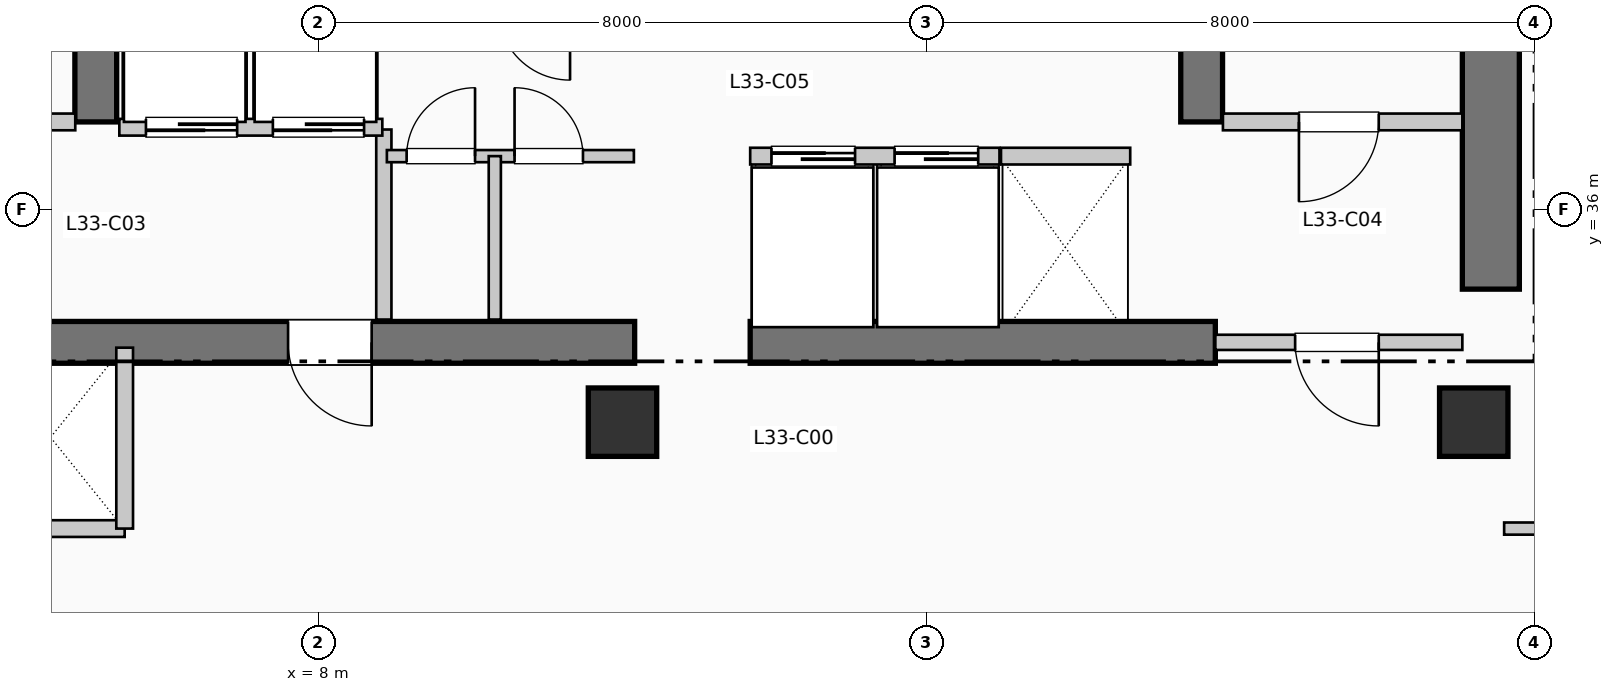
"""IFC4 building model, lengths in metres.
Left out: names, types, materials, properties, quantities, classifications, styles, units other than length and angle.
Written with IfcOpenShell. Run it as: python <this file> out.ifc"""

import sys

from ifc_helpers import new_model, si_unit, direction, frame, frame_2d, origin, origin_2d, place, context, subcontext, project, spatial, rectangle, extrude, element, fill, save


model = new_model("IFC4")
c1 = context("Model", 3, precision=1e-05, world=origin(), true_north=direction((0.0, 1.0)))
c2 = subcontext(c1, "Body", "Model", "MODEL_VIEW")
j1 = project(units=[si_unit("LENGTHUNIT", "METRE"), si_unit("PLANEANGLEUNIT", "RADIAN")], contexts=[c1])
p1 = place(None, origin())
s1 = spatial("IfcSite", under=j1, at=p1, CompositionType="ELEMENT")
p2 = place(p1, origin())
s2 = spatial("IfcBuilding", under=s1, at=p2, CompositionType="ELEMENT")
p3 = place(p2, frame((0.0, 0.0, 138.93)))
s3 = spatial("IfcBuildingStorey", under=s2, at=p3, CompositionType="ELEMENT", Elevation=138.93)
p4 = place(p3, frame((23.425, 34.95, 0.0), z_axis=(0.0, 0.0, 1.0), x_axis=(0.0, 1.0, 0.0)))
e1 = element("IfcWall", 1, at=p4, inside=s3, PredefinedType="SHEAR", context=c2, shape_type="SweptSolid", body=[
    extrude(rectangle(XDim=10.64, YDim=0.75, at=frame_2d((5.32, 0.0))), origin(), (0.0, 0.0, 1.0), 3.96),
])
p5 = place(p3, frame((1.45, 34.25, 0.0), z_axis=(0.0, 0.0, 1.0), x_axis=(1.0, 0.0, 0.0)))
e2 = element("IfcWall", 2, at=p5, inside=s3, PredefinedType="SHEAR", context=c2, shape_type="SweptSolid", body=[
    extrude(rectangle(XDim=10.71, YDim=0.55, at=frame_2d((5.355, 0.0))), origin(), (0.0, 0.0, 1.0), 3.96),
])
p6 = place(p5, frame((7.25, 0.0, 0.0), z_axis=(0.0, 0.0, 1.0), x_axis=(-1.0, 0.0, 0.0)))
e3 = element("IfcOpeningElement", 3, at=p6, cuts=e2, PredefinedType="OPENING", context=c2, shape_type="SweptSolid", body=[
    extrude(rectangle(XDim=1.1, YDim=2.15, at=frame_2d((0.55, 1.075))), frame((0.0, 0.285, 0.0), z_axis=(0.0, -1.0, 0.0), x_axis=(1.0, 0.0, 0.0)), (0.0, 0.0, 1.0), 0.57),
])
p7 = place(p3, frame((13.68, 34.25, 0.0), z_axis=(0.0, 0.0, 1.0), x_axis=(1.0, 0.0, 0.0)))
e4 = element("IfcWall", 4, at=p7, inside=s3, PredefinedType="SHEAR", context=c2, shape_type="SweptSolid", body=[
    extrude(rectangle(XDim=6.12, YDim=0.55, at=frame_2d((3.06, 0.0))), origin(), (0.0, 0.0, 1.0), 3.96),
])
for number, where, z_axis, x_axis in (
    (5, (5.07, 37.15, 0.0), (0.0, 0.0, 1.0), (0.0, 1.0, 0.0)),
    (6, (19.62, 37.15, 0.0), (0.0, 0.0, 1.0), (0.0, 1.0, 0.0)),
):
    element("IfcWall", number, at=place(p3, frame(where, z_axis=z_axis, x_axis=x_axis)), inside=s3, PredefinedType="SHEAR", context=c2, shape_type="SweptSolid", body=[
        extrude(rectangle(XDim=7.89, YDim=0.55, at=frame_2d((3.945, 0.0))), origin(), (0.0, 0.0, 1.0), 3.96),
    ])
for number, where, z_axis, x_axis in (
    (7, (12.0, 33.2, 0.0), (0.0, 0.0, 1.0), (1.0, 0.0, 0.0)),
    (8, (23.2, 33.2, 0.0), (0.0, 0.0, 1.0), (1.0, 0.0, 0.0)),
):
    element("IfcColumn", number, at=place(p3, frame(where, z_axis=z_axis, x_axis=x_axis)), inside=s3, PredefinedType="COLUMN", context=c2, shape_type="SweptSolid", body=[
        extrude(rectangle(XDim=0.9, YDim=0.9, at=origin_2d()), origin(), (0.0, 0.0, 1.0), 3.96),
    ])
p8 = place(p3, frame((1.65, 37.15, 0.0), z_axis=(0.0, 0.0, 1.0), x_axis=(1.0, 0.0, 0.0)))
e9 = element("IfcWall", 9, at=p8, inside=s3, PredefinedType="PARTITIONING", context=c2, shape_type="SweptSolid", body=[
    extrude(rectangle(XDim=3.15, YDim=0.22, at=frame_2d((1.575, 0.0))), origin(), (0.0, 0.0, 1.0), 3.71),
])
p9 = place(p8, frame((2.05, 0.0, 0.0), z_axis=(0.0, 0.0, 1.0), x_axis=(-1.0, 0.0, 0.0)))
e10 = element("IfcOpeningElement", 10, at=p9, cuts=e9, PredefinedType="OPENING", context=c2, shape_type="SweptSolid", body=[
    extrude(rectangle(XDim=1.05, YDim=2.15, at=frame_2d((0.525, 1.075))), frame((0.0, 0.12, 0.0), z_axis=(0.0, -1.0, 0.0), x_axis=(1.0, 0.0, 0.0)), (0.0, 0.0, 1.0), 0.24),
])
p10 = place(p3, frame((8.86, 34.55, 0.0), z_axis=(0.0, 0.0, 1.0), x_axis=(0.0, 1.0, 0.0)))
e11 = element("IfcWall", 11, at=p10, inside=s3, PredefinedType="PARTITIONING", context=c2, shape_type="SweptSolid", body=[
    extrude(rectangle(XDim=2.5, YDim=0.2, at=frame_2d((1.25, 0.0))), origin(), (0.0, 0.0, 1.0), 3.71),
])
p11 = place(p3, frame((19.9, 37.15, 0.0), z_axis=(0.0, 0.0, 1.0), x_axis=(1.0, 0.0, 0.0)))
e12 = element("IfcWall", 12, at=p11, inside=s3, PredefinedType="PARTITIONING", context=c2, shape_type="SweptSolid", body=[
    extrude(rectangle(XDim=3.15, YDim=0.22, at=frame_2d((1.575, 0.0))), origin(), (0.0, 0.0, 1.0), 3.71),
])
p12 = place(p11, frame((2.05, 0.0, 0.0), z_axis=(0.0, 0.0, 1.0), x_axis=(-1.0, 0.0, 0.0)))
e13 = element("IfcOpeningElement", 13, at=p12, cuts=e12, PredefinedType="OPENING", context=c2, shape_type="SweptSolid", body=[
    extrude(rectangle(XDim=1.05, YDim=2.15, at=frame_2d((0.525, 1.075))), frame((0.0, 0.12, 0.0), z_axis=(0.0, -1.0, 0.0), x_axis=(1.0, 0.0, 0.0)), (0.0, 0.0, 1.0), 0.24),
])
p13 = place(p3, frame((19.8, 34.25, 0.0), z_axis=(0.0, 0.0, 1.0), x_axis=(1.0, 0.0, 0.0)))
e14 = element("IfcWall", 14, at=p13, inside=s3, PredefinedType="PARTITIONING", context=c2, shape_type="SweptSolid", body=[
    extrude(rectangle(XDim=3.25, YDim=0.2, at=frame_2d((1.625, 0.0))), origin(), (0.0, 0.0, 1.0), 3.71),
])
p14 = place(p13, frame((2.15, 0.0, 0.0), z_axis=(0.0, 0.0, 1.0), x_axis=(-1.0, 0.0, 0.0)))
e15 = element("IfcOpeningElement", 15, at=p14, cuts=e14, PredefinedType="OPENING", context=c2, shape_type="SweptSolid", body=[
    extrude(rectangle(XDim=1.1, YDim=2.15, at=frame_2d((0.55, 1.075))), frame((0.0, 0.11, 0.0), z_axis=(0.0, -1.0, 0.0), x_axis=(1.0, 0.0, 0.0)), (0.0, 0.0, 1.0), 0.22),
])
p15 = place(p3, frame((5.38, 37.08, 0.0), z_axis=(0.0, 0.0, 1.0), x_axis=(1.0, 0.0, 0.0)))
e16 = element("IfcWall", 16, at=p15, inside=s3, PredefinedType="PARTITIONING", context=c2, shape_type="SweptSolid", body=[
    extrude(rectangle(XDim=3.46, YDim=0.22, at=frame_2d((1.73, 0.0))), origin(), (0.0, 0.0, 1.0), 3.71),
])
p16 = place(p15, frame((1.55, 0.0, 0.0), z_axis=(0.0, 0.0, 1.0), x_axis=(-1.0, 0.0, 0.0)))
e17 = element("IfcOpeningElement", 17, at=p16, cuts=e16, PredefinedType="OPENING", context=c2, shape_type="SweptSolid", body=[
    extrude(rectangle(XDim=1.2, YDim=2.2, at=frame_2d((0.6, 1.1))), frame((0.0, 0.12, 0.0), z_axis=(0.0, -1.0, 0.0), x_axis=(1.0, 0.0, 0.0)), (0.0, 0.0, 1.0), 0.24),
])
p17 = place(p15, frame((3.22, 0.0, 0.0), z_axis=(0.0, 0.0, 1.0), x_axis=(-1.0, 0.0, 0.0)))
e18 = element("IfcOpeningElement", 18, at=p17, cuts=e16, PredefinedType="OPENING", context=c2, shape_type="SweptSolid", body=[
    extrude(rectangle(XDim=1.2, YDim=2.2, at=frame_2d((0.6, 1.1))), frame((0.0, 0.12, 0.0), z_axis=(0.0, -1.0, 0.0), x_axis=(1.0, 0.0, 0.0)), (0.0, 0.0, 1.0), 0.24),
])
p18 = place(p3, frame((1.55, 31.8, 0.0), z_axis=(0.0, 0.0, 1.0), x_axis=(1.0, 0.0, 0.0)))
e19 = element("IfcWall", 19, at=p18, inside=s3, PredefinedType="PARTITIONING", context=c2, shape_type="SweptSolid", body=[
    extrude(rectangle(XDim=3.9, YDim=0.22, at=frame_2d((1.95, 0.0))), origin(), (0.0, 0.0, 1.0), 3.71),
])
p19 = place(p3, frame((5.45, 31.8, 0.0), z_axis=(0.0, 0.0, 1.0), x_axis=(0.0, 1.0, 0.0)))
e20 = element("IfcWall", 20, at=p19, inside=s3, PredefinedType="PARTITIONING", context=c2, shape_type="SweptSolid", body=[
    extrude(rectangle(XDim=2.38, YDim=0.22, at=frame_2d((1.19, 0.0))), origin(), (0.0, 0.0, 1.0), 3.71),
])
p20 = place(p3, frame((8.9, 36.7, 0.0), z_axis=(0.0, 0.0, 1.0), x_axis=(1.0, 0.0, 0.0)))
e21 = element("IfcWall", 21, at=p20, inside=s3, PredefinedType="PARTITIONING", context=c2, shape_type="SweptSolid", body=[
    extrude(rectangle(XDim=3.25, YDim=0.16, at=frame_2d((1.625, 0.0))), origin(), (0.0, 0.0, 1.0), 3.71),
])
p21 = place(p20, frame((0.26, 0.0, 0.0)))
e22 = element("IfcOpeningElement", 22, at=p21, cuts=e21, PredefinedType="OPENING", context=c2, shape_type="SweptSolid", body=[
    extrude(rectangle(XDim=0.9, YDim=2.15, at=frame_2d((0.45, 1.075))), frame((0.0, 0.09, 0.0), z_axis=(0.0, -1.0, 0.0), x_axis=(1.0, 0.0, 0.0)), (0.0, 0.0, 1.0), 0.18),
])
p22 = place(p20, frame((1.68, 0.0, 0.0)))
e23 = element("IfcOpeningElement", 23, at=p22, cuts=e21, PredefinedType="OPENING", context=c2, shape_type="SweptSolid", body=[
    extrude(rectangle(XDim=0.9, YDim=2.15, at=frame_2d((0.45, 1.075))), frame((0.0, 0.09, 0.0), z_axis=(0.0, -1.0, 0.0), x_axis=(1.0, 0.0, 0.0)), (0.0, 0.0, 1.0), 0.18),
])
p23 = place(p3, frame((10.32, 34.55, 0.0), z_axis=(0.0, 0.0, 1.0), x_axis=(0.0, 1.0, 0.0)))
e24 = element("IfcWall", 24, at=p23, inside=s3, PredefinedType="PARTITIONING", context=c2, shape_type="SweptSolid", body=[
    extrude(rectangle(XDim=2.15, YDim=0.16, at=frame_2d((1.075, 0.0))), origin(), (0.0, 0.0, 1.0), 3.71),
])
p24 = place(p3, frame((13.68, 36.7, 0.0), z_axis=(0.0, 0.0, 1.0), x_axis=(1.0, 0.0, 0.0)))
e25 = element("IfcWall", 25, at=p24, inside=s3, PredefinedType="PARTITIONING", context=c2, shape_type="SweptSolid", body=[
    extrude(rectangle(XDim=3.28, YDim=0.22, at=frame_2d((1.64, 0.0))), origin(), (0.0, 0.0, 1.0), 3.71),
])
p25 = place(p24, frame((0.28, 0.0, 0.0)))
e26 = element("IfcOpeningElement", 26, at=p25, cuts=e25, PredefinedType="OPENING", context=c2, shape_type="SweptSolid", body=[
    extrude(rectangle(XDim=1.1, YDim=2.2, at=frame_2d((0.55, 1.1))), frame((0.0, 0.12, 0.0), z_axis=(0.0, -1.0, 0.0), x_axis=(1.0, 0.0, 0.0)), (0.0, 0.0, 1.0), 0.24),
])
p26 = place(p24, frame((1.9, 0.0, 0.0)))
e27 = element("IfcOpeningElement", 27, at=p26, cuts=e25, PredefinedType="OPENING", context=c2, shape_type="SweptSolid", body=[
    extrude(rectangle(XDim=1.1, YDim=2.2, at=frame_2d((0.55, 1.1))), frame((0.0, 0.12, 0.0), z_axis=(0.0, -1.0, 0.0), x_axis=(1.0, 0.0, 0.0)), (0.0, 0.0, 1.0), 0.24),
])
p27 = place(p3, frame((16.98, 36.7, 0.0), z_axis=(0.0, 0.0, 1.0), x_axis=(1.0, 0.0, 0.0)))
e28 = element("IfcWall", 28, at=p27, inside=s3, PredefinedType="PARTITIONING", context=c2, shape_type="SweptSolid", body=[
    extrude(rectangle(XDim=1.7, YDim=0.22, at=frame_2d((0.85, 0.0))), origin(), (0.0, 0.0, 1.0), 3.71),
])
p28 = place(p3, frame((23.6, 31.8, 0.0), z_axis=(0.0, 0.0, 1.0), x_axis=(1.0, 0.0, 0.0)))
e29 = element("IfcWall", 29, at=p28, inside=s3, PredefinedType="PARTITIONING", context=c2, shape_type="SweptSolid", body=[
    extrude(rectangle(XDim=26.41, YDim=0.16, at=frame_2d((13.205, 0.0))), origin(), (0.0, 0.0, 1.0), 3.71),
])
p29 = place(p28, frame((2.43, 0.0, 0.0)))
e30 = element("IfcOpeningElement", 30, at=p29, cuts=e29, PredefinedType="OPENING", context=c2, shape_type="SweptSolid", body=[
    extrude(rectangle(XDim=0.95, YDim=2.15, at=frame_2d((0.475, 1.075))), frame((0.0, 0.09, 0.0), z_axis=(0.0, -1.0, 0.0), x_axis=(1.0, 0.0, 0.0)), (0.0, 0.0, 1.0), 0.18),
])
p30 = place(p28, frame((8.769, 0.0, 0.0)))
e31 = element("IfcOpeningElement", 31, at=p30, cuts=e29, PredefinedType="OPENING", context=c2, shape_type="SweptSolid", body=[
    extrude(rectangle(XDim=0.95, YDim=2.15, at=frame_2d((0.475, 1.075))), frame((0.0, 0.09, 0.0), z_axis=(0.0, -1.0, 0.0), x_axis=(1.0, 0.0, 0.0)), (0.0, 0.0, 1.0), 0.18),
])
p31 = place(p28, frame((16.767, 0.0, 0.0)))
e32 = element("IfcOpeningElement", 32, at=p31, cuts=e29, PredefinedType="OPENING", context=c2, shape_type="SweptSolid", body=[
    extrude(rectangle(XDim=0.95, YDim=2.15, at=frame_2d((0.475, 1.075))), frame((0.0, 0.09, 0.0), z_axis=(0.0, -1.0, 0.0), x_axis=(1.0, 0.0, 0.0)), (0.0, 0.0, 1.0), 0.18),
])
p32 = place(p28, frame((22.634, 0.0, 0.0)))
e33 = element("IfcOpeningElement", 33, at=p32, cuts=e29, PredefinedType="OPENING", context=c2, shape_type="SweptSolid", body=[
    extrude(rectangle(XDim=0.95, YDim=2.15, at=frame_2d((0.475, 1.075))), frame((0.0, 0.09, 0.0), z_axis=(0.0, -1.0, 0.0), x_axis=(1.0, 0.0, 0.0)), (0.0, 0.0, 1.0), 0.18),
])
p33 = place(p6, origin())
e34 = element("IfcDoor", 34, at=p33, inside=s3, OperationType="SINGLE_SWING_RIGHT", PredefinedType="DOOR", context=c2, shape_type="SweptSolid", body=[
    extrude(rectangle(XDim=1.1, YDim=2.15, at=frame_2d((0.55, 1.075))), frame((0.0, 0.025, 0.0), z_axis=(0.0, -1.0, 0.0), x_axis=(1.0, 0.0, 0.0)), (0.0, 0.0, 1.0), 0.05),
])
fill(e3, e34)
p34 = place(p12, origin())
e35 = element("IfcDoor", 35, at=p34, inside=s3, OperationType="SINGLE_SWING_LEFT", PredefinedType="DOOR", context=c2, shape_type="SweptSolid", body=[
    extrude(rectangle(XDim=1.05, YDim=2.15, at=frame_2d((0.525, 1.075))), frame((0.0, 0.025, 0.0), z_axis=(0.0, -1.0, 0.0), x_axis=(1.0, 0.0, 0.0)), (0.0, 0.0, 1.0), 0.05),
])
fill(e13, e35)
p35 = place(p14, origin())
e36 = element("IfcDoor", 36, at=p35, inside=s3, OperationType="SINGLE_SWING_RIGHT", PredefinedType="DOOR", context=c2, shape_type="SweptSolid", body=[
    extrude(rectangle(XDim=1.1, YDim=2.15, at=frame_2d((0.55, 1.075))), frame((0.0, 0.025, 0.0), z_axis=(0.0, -1.0, 0.0), x_axis=(1.0, 0.0, 0.0)), (0.0, 0.0, 1.0), 0.05),
])
fill(e15, e36)
p36 = place(p16, origin())
e37 = element("IfcDoor", 37, at=p36, inside=s3, OperationType="SLIDING_TO_RIGHT", PredefinedType="DOOR", context=c2, shape_type="SweptSolid", body=[
    extrude(rectangle(XDim=1.2, YDim=2.2, at=frame_2d((0.6, 1.1))), frame((0.0, 0.025, 0.0), z_axis=(0.0, -1.0, 0.0), x_axis=(1.0, 0.0, 0.0)), (0.0, 0.0, 1.0), 0.05),
])
fill(e17, e37)
p37 = place(p17, origin())
e38 = element("IfcDoor", 38, at=p37, inside=s3, OperationType="SLIDING_TO_RIGHT", PredefinedType="DOOR", context=c2, shape_type="SweptSolid", body=[
    extrude(rectangle(XDim=1.2, YDim=2.2, at=frame_2d((0.6, 1.1))), frame((0.0, 0.025, 0.0), z_axis=(0.0, -1.0, 0.0), x_axis=(1.0, 0.0, 0.0)), (0.0, 0.0, 1.0), 0.05),
])
fill(e18, e38)
p38 = place(p21, origin())
e39 = element("IfcDoor", 39, at=p38, inside=s3, OperationType="SINGLE_SWING_RIGHT", PredefinedType="DOOR", context=c2, shape_type="SweptSolid", body=[
    extrude(rectangle(XDim=0.9, YDim=2.15, at=frame_2d((0.45, 1.075))), frame((0.0, 0.025, 0.0), z_axis=(0.0, -1.0, 0.0), x_axis=(1.0, 0.0, 0.0)), (0.0, 0.0, 1.0), 0.05),
])
fill(e22, e39)
p39 = place(p22, origin())
e40 = element("IfcDoor", 40, at=p39, inside=s3, OperationType="SINGLE_SWING_LEFT", PredefinedType="DOOR", context=c2, shape_type="SweptSolid", body=[
    extrude(rectangle(XDim=0.9, YDim=2.15, at=frame_2d((0.45, 1.075))), frame((0.0, 0.025, 0.0), z_axis=(0.0, -1.0, 0.0), x_axis=(1.0, 0.0, 0.0)), (0.0, 0.0, 1.0), 0.05),
])
fill(e23, e40)
p40 = place(p25, origin())
e41 = element("IfcDoor", 41, at=p40, inside=s3, OperationType="SLIDING_TO_RIGHT", PredefinedType="DOOR", context=c2, shape_type="SweptSolid", body=[
    extrude(rectangle(XDim=1.1, YDim=2.2, at=frame_2d((0.55, 1.1))), frame((0.0, 0.025, 0.0), z_axis=(0.0, -1.0, 0.0), x_axis=(1.0, 0.0, 0.0)), (0.0, 0.0, 1.0), 0.05),
])
fill(e26, e41)
p41 = place(p26, origin())
e42 = element("IfcDoor", 42, at=p41, inside=s3, OperationType="SLIDING_TO_RIGHT", PredefinedType="DOOR", context=c2, shape_type="SweptSolid", body=[
    extrude(rectangle(XDim=1.1, YDim=2.2, at=frame_2d((0.55, 1.1))), frame((0.0, 0.025, 0.0), z_axis=(0.0, -1.0, 0.0), x_axis=(1.0, 0.0, 0.0)), (0.0, 0.0, 1.0), 0.05),
])
fill(e27, e42)
save(model, sys.argv[1])
